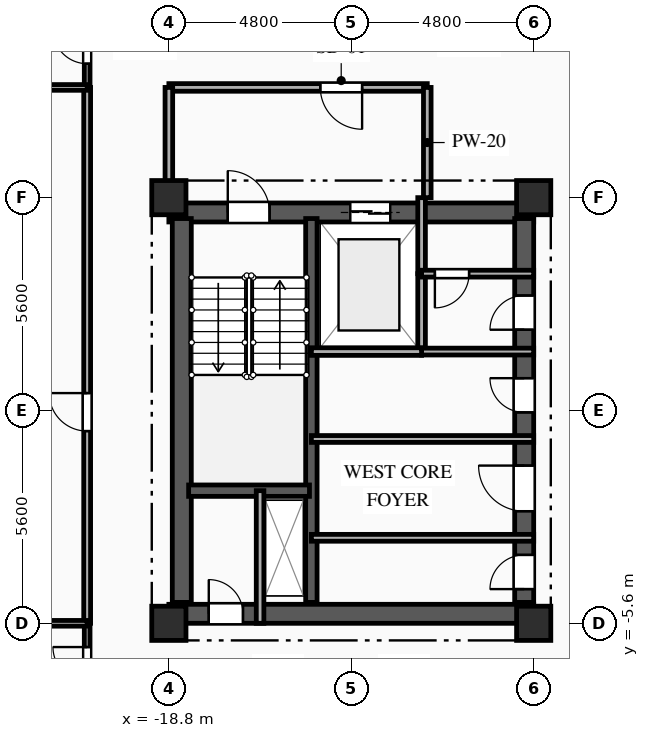
"""IFC4 building model, lengths in metres.
Left out: names, types, materials, properties, quantities, classifications, styles, units other than length and angle.
Written with IfcOpenShell. Run it as: python <this file> out.ifc"""

import sys

from ifc_helpers import new_model, si_unit, direction, frame, frame_2d, origin, origin_2d, place, context, subcontext, project, spatial, rectangle, extrude, element, fill, save


model = new_model("IFC4")
c1 = context("Model", 3, precision=1e-05, world=origin(), true_north=direction((0.0, 1.0)))
c2 = subcontext(c1, "Body", "Model", "MODEL_VIEW")
j1 = project(units=[si_unit("LENGTHUNIT", "METRE"), si_unit("PLANEANGLEUNIT", "RADIAN")], contexts=[c1])
p1 = place(None, origin())
s1 = spatial("IfcSite", under=j1, at=p1, CompositionType="ELEMENT")
p2 = place(p1, origin())
s2 = spatial("IfcBuilding", under=s1, at=p2, CompositionType="ELEMENT")
p3 = place(p2, frame((0.0, 0.0, 167.85)))
s3 = spatial("IfcBuildingStorey", under=s2, at=p3, CompositionType="ELEMENT", Elevation=167.85)
for number, where, z_axis, x_axis in (
    (1, (-18.8, -5.6, 0.0), (0.0, 0.0, 1.0), (1.0, 0.0, 0.0)),
    (2, (-18.8, 5.6, 0.0), (0.0, 0.0, 1.0), (1.0, 0.0, 0.0)),
    (3, (-9.2, -5.6, 0.0), (0.0, 0.0, 1.0), (1.0, 0.0, 0.0)),
    (4, (-9.2, 5.6, 0.0), (0.0, 0.0, 1.0), (1.0, 0.0, 0.0)),
):
    element("IfcColumn", number, at=place(p3, frame(where, z_axis=z_axis, x_axis=x_axis)), inside=s3, PredefinedType="COLUMN", context=c2, shape_type="SweptSolid", body=[
        extrude(rectangle(XDim=0.9, YDim=0.9, at=origin_2d()), origin(), (0.0, 0.0, 1.0), 3.35),
    ])
p4 = place(p3, frame((-18.8, 5.21, 0.0), z_axis=(0.0, 0.0, 1.0), x_axis=(1.0, 0.0, 0.0)))
e5 = element("IfcWall", 5, at=p4, inside=s3, PredefinedType="SHEAR", context=c2, shape_type="SweptSolid", body=[
    extrude(rectangle(XDim=9.6, YDim=0.5, at=frame_2d((4.8, 0.0))), origin(), (0.0, 0.0, 1.0), 3.04),
])
p5 = place(p4, frame((1.55, 0.0, 0.0)))
e6 = element("IfcOpeningElement", 6, at=p5, cuts=e5, PredefinedType="OPENING", context=c2, shape_type="SweptSolid", body=[
    extrude(rectangle(XDim=1.1, YDim=2.15, at=frame_2d((0.55, 1.075))), frame((0.0, 0.26, 0.0), z_axis=(0.0, -1.0, 0.0), x_axis=(1.0, 0.0, 0.0)), (0.0, 0.0, 1.0), 0.52),
])
p6 = place(p4, frame((4.775, 0.0, 0.0)))
e7 = element("IfcOpeningElement", 7, at=p6, cuts=e5, PredefinedType="OPENING", context=c2, shape_type="SweptSolid", body=[
    extrude(rectangle(XDim=1.05, YDim=2.1, at=frame_2d((0.525, 1.05))), frame((0.0, 0.26, 0.0), z_axis=(0.0, -1.0, 0.0), x_axis=(1.0, 0.0, 0.0)), (0.0, 0.0, 1.0), 0.52),
])
p7 = place(p3, frame((-18.8, -5.35, 0.0), z_axis=(0.0, 0.0, 1.0), x_axis=(1.0, 0.0, 0.0)))
e8 = element("IfcWall", 8, at=p7, inside=s3, PredefinedType="SHEAR", context=c2, shape_type="SweptSolid", body=[
    extrude(rectangle(XDim=9.6, YDim=0.5, at=frame_2d((4.8, 0.0))), origin(), (0.0, 0.0, 1.0), 3.04),
])
p8 = place(p7, frame((1.05, 0.0, 0.0)))
e9 = element("IfcOpeningElement", 9, at=p8, cuts=e8, PredefinedType="OPENING", context=c2, shape_type="SweptSolid", body=[
    extrude(rectangle(XDim=0.9, YDim=2.1, at=frame_2d((0.45, 1.05))), frame((0.0, 0.26, 0.0), z_axis=(0.0, -1.0, 0.0), x_axis=(1.0, 0.0, 0.0)), (0.0, 0.0, 1.0), 0.52),
])
p9 = place(p3, frame((-18.46, -5.05, 0.0), z_axis=(0.0, 0.0, 1.0), x_axis=(0.0, 1.0, 0.0)))
e10 = element("IfcWall", 10, at=p9, inside=s3, PredefinedType="SHEAR", context=c2, shape_type="SweptSolid", body=[
    extrude(rectangle(XDim=10.1, YDim=0.5, at=frame_2d((5.05, 0.0))), origin(), (0.0, 0.0, 1.0), 3.04),
])
p10 = place(p3, frame((-9.45, -5.05, 0.0), z_axis=(0.0, 0.0, 1.0), x_axis=(0.0, 1.0, 0.0)))
e11 = element("IfcWall", 11, at=p10, inside=s3, PredefinedType="SHEAR", context=c2, shape_type="SweptSolid", body=[
    extrude(rectangle(XDim=10.1, YDim=0.5, at=frame_2d((5.05, 0.0))), origin(), (0.0, 0.0, 1.0), 3.04),
])
p11 = place(p10, frame((7.175, 0.0, 0.0)))
e12 = element("IfcOpeningElement", 12, at=p11, cuts=e11, PredefinedType="OPENING", context=c2, shape_type="SweptSolid", body=[
    extrude(rectangle(XDim=0.9, YDim=2.1, at=frame_2d((0.45, 1.05))), frame((0.0, 0.26, 0.0), z_axis=(0.0, -1.0, 0.0), x_axis=(1.0, 0.0, 0.0)), (0.0, 0.0, 1.0), 0.52),
])
p12 = place(p10, frame((2.4, 0.0, 0.0)))
e13 = element("IfcOpeningElement", 13, at=p12, cuts=e11, PredefinedType="OPENING", context=c2, shape_type="SweptSolid", body=[
    extrude(rectangle(XDim=1.2, YDim=2.15, at=frame_2d((0.6, 1.075))), frame((0.0, 0.26, 0.0), z_axis=(0.0, -1.0, 0.0), x_axis=(1.0, 0.0, 0.0)), (0.0, 0.0, 1.0), 0.52),
])
p13 = place(p10, frame((0.35, 0.0, 0.0)))
e14 = element("IfcOpeningElement", 14, at=p13, cuts=e11, PredefinedType="OPENING", context=c2, shape_type="SweptSolid", body=[
    extrude(rectangle(XDim=0.9, YDim=2.1, at=frame_2d((0.45, 1.05))), frame((0.0, 0.26, 0.0), z_axis=(0.0, -1.0, 0.0), x_axis=(1.0, 0.0, 0.0)), (0.0, 0.0, 1.0), 0.52),
])
p14 = place(p10, frame((5.0, 0.0, 0.0)))
e15 = element("IfcOpeningElement", 15, at=p14, cuts=e11, PredefinedType="OPENING", context=c2, shape_type="SweptSolid", body=[
    extrude(rectangle(XDim=0.9, YDim=2.1, at=frame_2d((0.45, 1.05))), frame((0.0, 0.26, 0.0), z_axis=(0.0, -1.0, 0.0), x_axis=(1.0, 0.0, 0.0)), (0.0, 0.0, 1.0), 0.52),
])
p15 = place(p3, frame((-15.05, -5.05, 0.0), z_axis=(0.0, 0.0, 1.0), x_axis=(0.0, 1.0, 0.0)))
e16 = element("IfcWall", 16, at=p15, inside=s3, PredefinedType="SHEAR", context=c2, shape_type="SweptSolid", body=[
    extrude(rectangle(XDim=10.1, YDim=0.3, at=frame_2d((5.05, 0.0))), origin(), (0.0, 0.0, 1.0), 3.04),
])
p16 = place(p3, frame((-18.28, -2.11, 0.0), z_axis=(0.0, 0.0, 1.0), x_axis=(1.0, 0.0, 0.0)))
e17 = element("IfcWall", 17, at=p16, inside=s3, PredefinedType="SHEAR", context=c2, shape_type="SweptSolid", body=[
    extrude(rectangle(XDim=3.18, YDim=0.3, at=frame_2d((1.59, 0.0))), origin(), (0.0, 0.0, 1.0), 3.04),
])
p17 = place(p3, frame((-16.4, -5.6, 0.0), z_axis=(0.0, 0.0, 1.0), x_axis=(0.0, 1.0, 0.0)))
e18 = element("IfcWall", 18, at=p17, inside=s3, PredefinedType="PARTITIONING", context=c2, shape_type="SweptSolid", body=[
    extrude(rectangle(XDim=3.49, YDim=0.2, at=frame_2d((1.745, 0.0))), origin(), (0.0, 0.0, 1.0), 3.04),
])
p18 = place(p3, frame((-12.15, 1.55, 0.0), z_axis=(0.0, 0.0, 1.0), x_axis=(0.0, 1.0, 0.0)))
e19 = element("IfcWall", 19, at=p18, inside=s3, PredefinedType="PARTITIONING", context=c2, shape_type="SweptSolid", body=[
    extrude(rectangle(XDim=2.05, YDim=0.2, at=frame_2d((1.025, 0.0))), origin(), (0.0, 0.0, 1.0), 3.04),
])
p19 = place(p3, frame((-12.15, 3.6, 0.0), z_axis=(0.0, 0.0, 1.0), x_axis=(0.0, 1.0, 0.0)))
e20 = element("IfcWall", 20, at=p19, inside=s3, PredefinedType="PARTITIONING", context=c2, shape_type="SweptSolid", body=[
    extrude(rectangle(XDim=2.0, YDim=0.2, at=frame_2d((1.0, 0.0))), origin(), (0.0, 0.0, 1.0), 3.04),
])
p20 = place(p3, frame((-12.0, 8.5, 0.0), z_axis=(0.0, 0.0, 1.0), x_axis=(-1.0, 0.0, 0.0)))
e21 = element("IfcWall", 21, at=p20, inside=s3, PredefinedType="PARTITIONING", context=c2, shape_type="SweptSolid", body=[
    extrude(rectangle(XDim=6.8, YDim=0.2, at=frame_2d((3.4, 0.0))), origin(), (0.0, 0.0, 1.0), 3.04),
])
p21 = place(p20, frame((1.715, 0.0, 0.0)))
e22 = element("IfcOpeningElement", 22, at=p21, cuts=e21, PredefinedType="OPENING", context=c2, shape_type="SweptSolid", body=[
    extrude(rectangle(XDim=1.1, YDim=2.15, at=frame_2d((0.55, 1.075))), frame((0.0, 0.11, 0.0), z_axis=(0.0, -1.0, 0.0), x_axis=(1.0, 0.0, 0.0)), (0.0, 0.0, 1.0), 0.22),
])
p22 = place(p3, frame((-18.8, 8.5, 0.0), z_axis=(0.0, 0.0, 1.0), x_axis=(0.0, -1.0, 0.0)))
e23 = element("IfcWall", 23, at=p22, inside=s3, PredefinedType="PARTITIONING", context=c2, shape_type="SweptSolid", body=[
    extrude(rectangle(XDim=2.9, YDim=0.2, at=frame_2d((1.45, 0.0))), origin(), (0.0, 0.0, 1.0), 2.525),
])
p23 = place(p3, frame((-12.0, 5.6, 0.0), z_axis=(0.0, 0.0, 1.0), x_axis=(0.0, 1.0, 0.0)))
e24 = element("IfcWall", 24, at=p23, inside=s3, PredefinedType="PARTITIONING", context=c2, shape_type="SweptSolid", body=[
    extrude(rectangle(XDim=2.9, YDim=0.2, at=frame_2d((1.45, 0.0))), origin(), (0.0, 0.0, 1.0), 3.04),
])
p24 = place(p3, frame((-9.2, 3.6, 0.0), z_axis=(0.0, 0.0, 1.0), x_axis=(-1.0, 0.0, 0.0)))
e25 = element("IfcWall", 25, at=p24, inside=s3, PredefinedType="PARTITIONING", context=c2, shape_type="SweptSolid", body=[
    extrude(rectangle(XDim=2.95, YDim=0.18, at=frame_2d((1.475, 0.0))), origin(), (0.0, 0.0, 1.0), 3.04),
])
p25 = place(p24, frame((1.7, 0.0, 0.0)))
e26 = element("IfcOpeningElement", 26, at=p25, cuts=e25, PredefinedType="OPENING", context=c2, shape_type="SweptSolid", body=[
    extrude(rectangle(XDim=0.9, YDim=2.1, at=frame_2d((0.45, 1.05))), frame((0.0, 0.1, 0.0), z_axis=(0.0, -1.0, 0.0), x_axis=(1.0, 0.0, 0.0)), (0.0, 0.0, 1.0), 0.2),
])
p26 = place(p3, frame((-12.15, 1.55, 0.0), z_axis=(0.0, 0.0, 1.0), x_axis=(1.0, 0.0, 0.0)))
e27 = element("IfcWall", 27, at=p26, inside=s3, PredefinedType="PARTITIONING", context=c2, shape_type="SweptSolid", body=[
    extrude(rectangle(XDim=2.95, YDim=0.18, at=frame_2d((1.475, 0.0))), origin(), (0.0, 0.0, 1.0), 3.04),
])
p27 = place(p3, frame((-15.05, -3.35, 0.0), z_axis=(0.0, 0.0, 1.0), x_axis=(1.0, 0.0, 0.0)))
e28 = element("IfcWall", 28, at=p27, inside=s3, PredefinedType="PARTITIONING", context=c2, shape_type="SweptSolid", body=[
    extrude(rectangle(XDim=5.85, YDim=0.18, at=frame_2d((2.925, 0.0))), origin(), (0.0, 0.0, 1.0), 2.755),
])
p28 = place(p3, frame((-9.2, -0.75, 0.0), z_axis=(0.0, 0.0, 1.0), x_axis=(-1.0, 0.0, 0.0)))
e29 = element("IfcWall", 29, at=p28, inside=s3, PredefinedType="PARTITIONING", context=c2, shape_type="SweptSolid", body=[
    extrude(rectangle(XDim=5.85, YDim=0.18, at=frame_2d((2.925, 0.0))), origin(), (0.0, 0.0, 1.0), 3.04),
])
p29 = place(p3, frame((-20.95, 8.5, 0.0), z_axis=(0.0, 0.0, 1.0), x_axis=(0.0, 1.0, 0.0)))
e30 = element("IfcWall", 30, at=p29, inside=s3, PredefinedType="PARTITIONING", context=c2, shape_type="SweptSolid", body=[
    extrude(rectangle(XDim=2.15, YDim=0.15, at=frame_2d((1.075, 0.0))), origin(), (0.0, 0.0, 1.0), 3.04),
])
p30 = place(p29, frame((0.625, 0.0, 0.0)))
e31 = element("IfcOpeningElement", 31, at=p30, cuts=e30, PredefinedType="OPENING", context=c2, shape_type="SweptSolid", body=[
    extrude(rectangle(XDim=0.9, YDim=2.1, at=frame_2d((0.45, 1.05))), frame((0.0, 0.085, 0.0), z_axis=(0.0, -1.0, 0.0), x_axis=(1.0, 0.0, 0.0)), (0.0, 0.0, 1.0), 0.17),
])
p31 = place(p3, frame((-20.95, -7.75, 0.0), z_axis=(0.0, 0.0, 1.0), x_axis=(0.0, 1.0, 0.0)))
e32 = element("IfcWall", 32, at=p31, inside=s3, PredefinedType="PARTITIONING", context=c2, shape_type="SweptSolid", body=[
    extrude(rectangle(XDim=2.15, YDim=0.15, at=frame_2d((1.075, 0.0))), origin(), (0.0, 0.0, 1.0), 3.04),
])
p32 = place(p31, frame((0.625, 0.0, 0.0)))
e33 = element("IfcOpeningElement", 33, at=p32, cuts=e32, PredefinedType="OPENING", context=c2, shape_type="SweptSolid", body=[
    extrude(rectangle(XDim=0.9, YDim=2.1, at=frame_2d((0.45, 1.05))), frame((0.0, 0.085, 0.0), z_axis=(0.0, -1.0, 0.0), x_axis=(1.0, 0.0, 0.0)), (0.0, 0.0, 1.0), 0.17),
])
p33 = place(p3, frame((-20.95, -5.6, 0.0), z_axis=(0.0, 0.0, 1.0), x_axis=(0.0, 1.0, 0.0)))
e34 = element("IfcWall", 34, at=p33, inside=s3, PredefinedType="PARTITIONING", context=c2, shape_type="SweptSolid", body=[
    extrude(rectangle(XDim=14.1, YDim=0.18, at=frame_2d((7.05, 0.0))), origin(), (0.0, 0.0, 1.0), 3.04),
])
p34 = place(p33, frame((5.058, 0.0, 0.0)))
e35 = element("IfcOpeningElement", 35, at=p34, cuts=e34, PredefinedType="OPENING", context=c2, shape_type="SweptSolid", body=[
    extrude(rectangle(XDim=1.0, YDim=2.15, at=frame_2d((0.5, 1.075))), frame((0.0, 0.1, 0.0), z_axis=(0.0, -1.0, 0.0), x_axis=(1.0, 0.0, 0.0)), (0.0, 0.0, 1.0), 0.2),
])
p35 = place(p3, frame((-23.6, 8.5, 0.0), z_axis=(0.0, 0.0, 1.0), x_axis=(1.0, 0.0, 0.0)))
e36 = element("IfcWall", 36, at=p35, inside=s3, PredefinedType="PARTITIONING", context=c2, shape_type="SweptSolid", body=[
    extrude(rectangle(XDim=2.65, YDim=0.15, at=frame_2d((1.325, 0.0))), origin(), (0.0, 0.0, 1.0), 3.04),
])
p36 = place(p35, frame((0.635, 0.0, 0.0)))
e37 = element("IfcOpeningElement", 37, at=p36, cuts=e36, PredefinedType="OPENING", context=c2, shape_type="SweptSolid", body=[
    extrude(rectangle(XDim=1.05, YDim=2.15, at=frame_2d((0.525, 1.075))), frame((0.0, 0.085, 0.0), z_axis=(0.0, -1.0, 0.0), x_axis=(1.0, 0.0, 0.0)), (0.0, 0.0, 1.0), 0.17),
])
p37 = place(p3, frame((-20.95, -5.6, 0.0), z_axis=(0.0, 0.0, 1.0), x_axis=(-1.0, 0.0, 0.0)))
e38 = element("IfcWall", 38, at=p37, inside=s3, PredefinedType="PARTITIONING", context=c2, shape_type="SweptSolid", body=[
    extrude(rectangle(XDim=2.65, YDim=0.15, at=frame_2d((1.325, 0.0))), origin(), (0.0, 0.0, 1.0), 3.04),
])
p38 = place(p37, frame((0.965, 0.0, 0.0)))
e39 = element("IfcOpeningElement", 39, at=p38, cuts=e38, PredefinedType="OPENING", context=c2, shape_type="SweptSolid", body=[
    extrude(rectangle(XDim=1.05, YDim=2.15, at=frame_2d((0.525, 1.075))), frame((0.0, 0.085, 0.0), z_axis=(0.0, -1.0, 0.0), x_axis=(1.0, 0.0, 0.0)), (0.0, 0.0, 1.0), 0.17),
])
p39 = place(p3, frame((-15.05, 1.55, 0.0), z_axis=(0.0, 0.0, 1.0), x_axis=(1.0, 0.0, 0.0)))
e40 = element("IfcWall", 40, at=p39, inside=s3, PredefinedType="PARTITIONING", context=c2, shape_type="SweptSolid", body=[
    extrude(rectangle(XDim=2.9, YDim=0.2, at=frame_2d((1.45, 0.0))), origin(), (0.0, 0.0, 1.0), 3.04),
])
p40 = place(p5, origin())
e41 = element("IfcDoor", 41, at=p40, inside=s3, OperationType="SINGLE_SWING_LEFT", PredefinedType="DOOR", context=c2, shape_type="SweptSolid", body=[
    extrude(rectangle(XDim=1.1, YDim=2.15, at=frame_2d((0.55, 1.075))), frame((0.0, 0.025, 0.0), z_axis=(0.0, -1.0, 0.0), x_axis=(1.0, 0.0, 0.0)), (0.0, 0.0, 1.0), 0.05),
])
fill(e6, e41)
p41 = place(p6, origin())
e42 = element("IfcDoor", 42, at=p41, inside=s3, OperationType="DOUBLE_DOOR_SLIDING", PredefinedType="DOOR", context=c2, shape_type="SweptSolid", body=[
    extrude(rectangle(XDim=1.05, YDim=2.1, at=frame_2d((0.525, 1.05))), frame((0.0, 0.025, 0.0), z_axis=(0.0, -1.0, 0.0), x_axis=(1.0, 0.0, 0.0)), (0.0, 0.0, 1.0), 0.05),
])
fill(e7, e42)
p42 = place(p8, origin())
e43 = element("IfcDoor", 43, at=p42, inside=s3, OperationType="SINGLE_SWING_LEFT", PredefinedType="DOOR", context=c2, shape_type="SweptSolid", body=[
    extrude(rectangle(XDim=0.9, YDim=2.1, at=frame_2d((0.45, 1.05))), frame((0.0, 0.025, 0.0), z_axis=(0.0, -1.0, 0.0), x_axis=(1.0, 0.0, 0.0)), (0.0, 0.0, 1.0), 0.05),
])
fill(e9, e43)
p43 = place(p21, origin())
e44 = element("IfcDoor", 44, at=p43, inside=s3, OperationType="SINGLE_SWING_LEFT", PredefinedType="DOOR", context=c2, shape_type="SweptSolid", body=[
    extrude(rectangle(XDim=1.1, YDim=2.15, at=frame_2d((0.55, 1.075))), frame((0.0, 0.025, 0.0), z_axis=(0.0, -1.0, 0.0), x_axis=(1.0, 0.0, 0.0)), (0.0, 0.0, 1.0), 0.05),
])
fill(e22, e44)
p44 = place(p25, origin())
e45 = element("IfcDoor", 45, at=p44, inside=s3, OperationType="SINGLE_SWING_RIGHT", PredefinedType="DOOR", context=c2, shape_type="SweptSolid", body=[
    extrude(rectangle(XDim=0.9, YDim=2.1, at=frame_2d((0.45, 1.05))), frame((0.0, 0.025, 0.0), z_axis=(0.0, -1.0, 0.0), x_axis=(1.0, 0.0, 0.0)), (0.0, 0.0, 1.0), 0.05),
])
fill(e26, e45)
p45 = place(p11, origin())
e46 = element("IfcDoor", 46, at=p45, inside=s3, OperationType="SINGLE_SWING_LEFT", PredefinedType="DOOR", context=c2, shape_type="SweptSolid", body=[
    extrude(rectangle(XDim=0.9, YDim=2.1, at=frame_2d((0.45, 1.05))), frame((0.0, 0.025, 0.0), z_axis=(0.0, -1.0, 0.0), x_axis=(1.0, 0.0, 0.0)), (0.0, 0.0, 1.0), 0.05),
])
fill(e12, e46)
p46 = place(p12, origin())
e47 = element("IfcDoor", 47, at=p46, inside=s3, OperationType="SINGLE_SWING_RIGHT", PredefinedType="DOOR", context=c2, shape_type="SweptSolid", body=[
    extrude(rectangle(XDim=1.2, YDim=2.15, at=frame_2d((0.6, 1.075))), frame((0.0, 0.025, 0.0), z_axis=(0.0, -1.0, 0.0), x_axis=(1.0, 0.0, 0.0)), (0.0, 0.0, 1.0), 0.05),
])
fill(e13, e47)
p47 = place(p13, origin())
e48 = element("IfcDoor", 48, at=p47, inside=s3, OperationType="SINGLE_SWING_LEFT", PredefinedType="DOOR", context=c2, shape_type="SweptSolid", body=[
    extrude(rectangle(XDim=0.9, YDim=2.1, at=frame_2d((0.45, 1.05))), frame((0.0, 0.025, 0.0), z_axis=(0.0, -1.0, 0.0), x_axis=(1.0, 0.0, 0.0)), (0.0, 0.0, 1.0), 0.05),
])
fill(e14, e48)
p48 = place(p14, origin())
e49 = element("IfcDoor", 49, at=p48, inside=s3, OperationType="SINGLE_SWING_RIGHT", PredefinedType="DOOR", context=c2, shape_type="SweptSolid", body=[
    extrude(rectangle(XDim=0.9, YDim=2.1, at=frame_2d((0.45, 1.05))), frame((0.0, 0.025, 0.0), z_axis=(0.0, -1.0, 0.0), x_axis=(1.0, 0.0, 0.0)), (0.0, 0.0, 1.0), 0.05),
])
fill(e15, e49)
p49 = place(p30, origin())
e50 = element("IfcDoor", 50, at=p49, inside=s3, OperationType="SINGLE_SWING_RIGHT", PredefinedType="DOOR", context=c2, shape_type="SweptSolid", body=[
    extrude(rectangle(XDim=0.9, YDim=2.1, at=frame_2d((0.45, 1.05))), frame((0.0, 0.025, 0.0), z_axis=(0.0, -1.0, 0.0), x_axis=(1.0, 0.0, 0.0)), (0.0, 0.0, 1.0), 0.05),
])
fill(e31, e50)
p50 = place(p32, origin())
e51 = element("IfcDoor", 51, at=p50, inside=s3, OperationType="SINGLE_SWING_RIGHT", PredefinedType="DOOR", context=c2, shape_type="SweptSolid", body=[
    extrude(rectangle(XDim=0.9, YDim=2.1, at=frame_2d((0.45, 1.05))), frame((0.0, 0.025, 0.0), z_axis=(0.0, -1.0, 0.0), x_axis=(1.0, 0.0, 0.0)), (0.0, 0.0, 1.0), 0.05),
])
fill(e33, e51)
p51 = place(p34, origin())
e52 = element("IfcDoor", 52, at=p51, inside=s3, OperationType="SINGLE_SWING_RIGHT", PredefinedType="DOOR", context=c2, shape_type="SweptSolid", body=[
    extrude(rectangle(XDim=1.0, YDim=2.15, at=frame_2d((0.5, 1.075))), frame((0.0, 0.025, 0.0), z_axis=(0.0, -1.0, 0.0), x_axis=(1.0, 0.0, 0.0)), (0.0, 0.0, 1.0), 0.05),
])
fill(e35, e52)
save(model, sys.argv[1])
